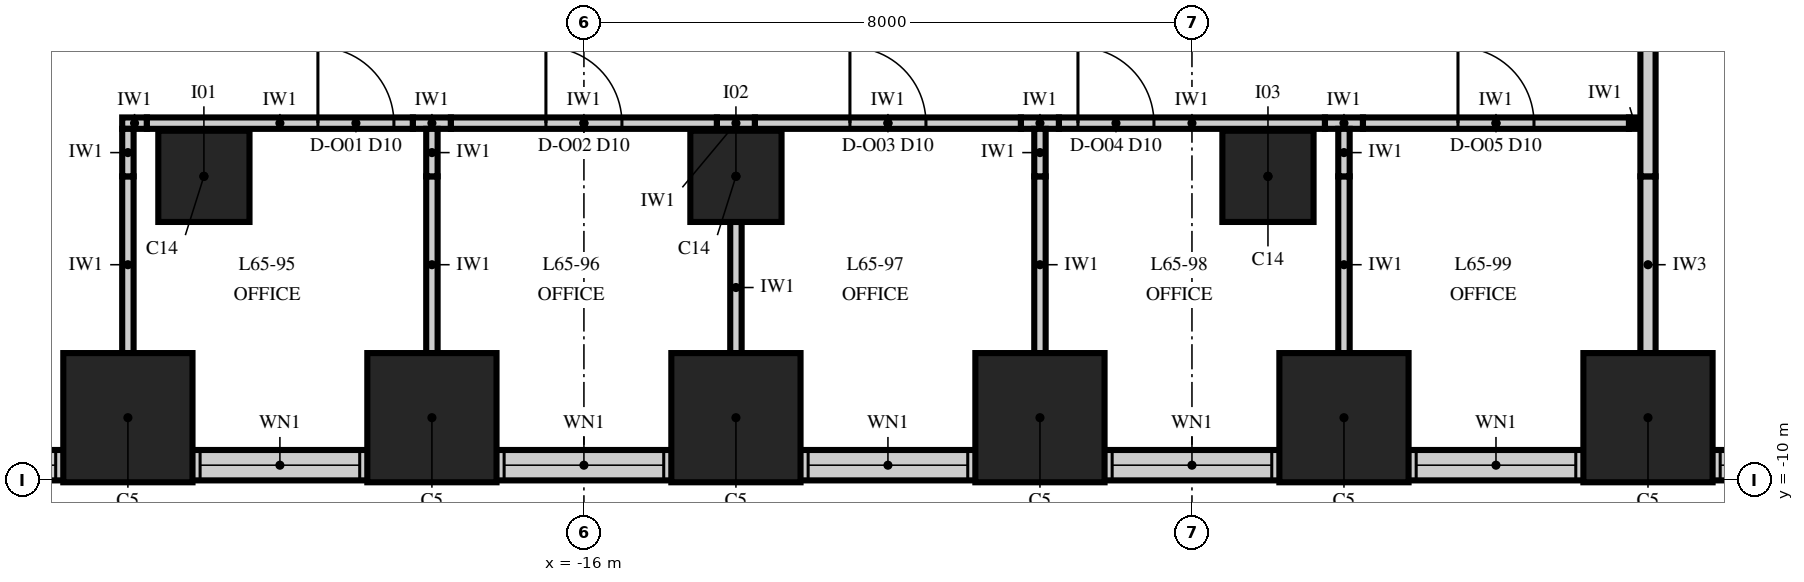
"""IFC4 building model, lengths in metres.
Left out: names, types, materials, properties, quantities, classifications, styles, units other than length and angle.
Written with IfcOpenShell. Run it as: python <this file> out.ifc"""

import sys

from ifc_helpers import new_model, si_unit, direction, frame, frame_2d, origin, origin_2d, place, context, subcontext, project, spatial, rectangle, extrude, element, fill, save


model = new_model("IFC4")
c1 = context("Model", 3, precision=1e-05, world=origin(), true_north=direction((0.0, 1.0)))
c2 = subcontext(c1, "Body", "Model", "MODEL_VIEW")
j1 = project(units=[si_unit("LENGTHUNIT", "METRE"), si_unit("PLANEANGLEUNIT", "RADIAN")], contexts=[c1])
p1 = place(None, origin())
s1 = spatial("IfcSite", under=j1, at=p1, CompositionType="ELEMENT")
p2 = place(p1, origin())
s2 = spatial("IfcBuilding", under=s1, at=p2, CompositionType="ELEMENT")
p3 = place(p2, frame((0.0, 0.0, 280.0)))
s3 = spatial("IfcBuildingStorey", under=s2, at=p3, CompositionType="ELEMENT", Elevation=280.0)
for number, where, z_axis, x_axis in (
    (1, (-22.0, -9.175, 0.0), (0.0, 0.0, 1.0), (1.0, 0.0, 0.0)),
    (2, (-18.0, -9.175, 0.0), (0.0, 0.0, 1.0), (1.0, 0.0, 0.0)),
    (3, (-14.0, -9.175, 0.0), (0.0, 0.0, 1.0), (1.0, 0.0, 0.0)),
    (4, (-10.0, -9.175, 0.0), (0.0, 0.0, 1.0), (1.0, 0.0, 0.0)),
    (5, (-6.0, -9.175, 0.0), (0.0, 0.0, 1.0), (1.0, 0.0, 0.0)),
    (6, (-2.0, -9.175, 0.0), (0.0, 0.0, 1.0), (1.0, 0.0, 0.0)),
):
    element("IfcColumn", number, at=place(p3, frame(where, z_axis=z_axis, x_axis=x_axis)), inside=s3, PredefinedType="COLUMN", context=c2, shape_type="SweptSolid", body=[
        extrude(rectangle(XDim=1.7, YDim=1.7, at=origin_2d()), origin(), (0.0, 0.0, 1.0), 4.0),
    ])
for number, where, z_axis, x_axis in (
    (7, (-21.0, -6.0, 0.0), (0.0, 0.0, 1.0), (1.0, 0.0, 0.0)),
    (8, (-14.0, -6.0, 0.0), (0.0, 0.0, 1.0), (1.0, 0.0, 0.0)),
    (9, (-7.0, -6.0, 0.0), (0.0, 0.0, 1.0), (1.0, 0.0, 0.0)),
):
    element("IfcColumn", number, at=place(p3, frame(where, z_axis=z_axis, x_axis=x_axis)), inside=s3, PredefinedType="COLUMN", context=c2, shape_type="SweptSolid", body=[
        extrude(rectangle(XDim=1.2, YDim=1.2, at=origin_2d()), origin(), (0.0, 0.0, 1.0), 4.0),
    ])
p4 = place(p3, frame((-26.0, -9.8, 0.0), z_axis=(0.0, 0.0, 1.0), x_axis=(1.0, 0.0, 0.0)))
e10 = element("IfcWall", 10, at=p4, inside=s3, PredefinedType="SOLIDWALL", context=c2, shape_type="SweptSolid", body=[
    extrude(rectangle(XDim=52.0, YDim=0.4, at=frame_2d((26.0, 0.0))), origin(), (0.0, 0.0, 1.0), 2.0),
])
p5 = place(p4, frame((0.95, 0.0, 0.8)))
e11 = element("IfcOpeningElement", 11, at=p5, cuts=e10, PredefinedType="OPENING", context=c2, shape_type="SweptSolid", body=[
    extrude(rectangle(XDim=2.1, YDim=1.15, at=frame_2d((1.05, 0.575))), frame((0.0, 0.215, 0.0), z_axis=(0.0, -1.0, 0.0), x_axis=(1.0, 0.0, 0.0)), (0.0, 0.0, 1.0), 0.43),
])
p6 = place(p4, frame((4.95, 0.0, 0.8)))
e12 = element("IfcOpeningElement", 12, at=p6, cuts=e10, PredefinedType="OPENING", context=c2, shape_type="SweptSolid", body=[
    extrude(rectangle(XDim=2.1, YDim=1.15, at=frame_2d((1.05, 0.575))), frame((0.0, 0.215, 0.0), z_axis=(0.0, -1.0, 0.0), x_axis=(1.0, 0.0, 0.0)), (0.0, 0.0, 1.0), 0.43),
])
p7 = place(p4, frame((8.95, 0.0, 0.8)))
e13 = element("IfcOpeningElement", 13, at=p7, cuts=e10, PredefinedType="OPENING", context=c2, shape_type="SweptSolid", body=[
    extrude(rectangle(XDim=2.1, YDim=1.15, at=frame_2d((1.05, 0.575))), frame((0.0, 0.215, 0.0), z_axis=(0.0, -1.0, 0.0), x_axis=(1.0, 0.0, 0.0)), (0.0, 0.0, 1.0), 0.43),
])
p8 = place(p4, frame((12.95, 0.0, 0.8)))
e14 = element("IfcOpeningElement", 14, at=p8, cuts=e10, PredefinedType="OPENING", context=c2, shape_type="SweptSolid", body=[
    extrude(rectangle(XDim=2.1, YDim=1.15, at=frame_2d((1.05, 0.575))), frame((0.0, 0.215, 0.0), z_axis=(0.0, -1.0, 0.0), x_axis=(1.0, 0.0, 0.0)), (0.0, 0.0, 1.0), 0.43),
])
p9 = place(p4, frame((16.95, 0.0, 0.8)))
e15 = element("IfcOpeningElement", 15, at=p9, cuts=e10, PredefinedType="OPENING", context=c2, shape_type="SweptSolid", body=[
    extrude(rectangle(XDim=2.1, YDim=1.15, at=frame_2d((1.05, 0.575))), frame((0.0, 0.215, 0.0), z_axis=(0.0, -1.0, 0.0), x_axis=(1.0, 0.0, 0.0)), (0.0, 0.0, 1.0), 0.43),
])
p10 = place(p4, frame((20.95, 0.0, 0.8)))
e16 = element("IfcOpeningElement", 16, at=p10, cuts=e10, PredefinedType="OPENING", context=c2, shape_type="SweptSolid", body=[
    extrude(rectangle(XDim=2.1, YDim=1.15, at=frame_2d((1.05, 0.575))), frame((0.0, 0.215, 0.0), z_axis=(0.0, -1.0, 0.0), x_axis=(1.0, 0.0, 0.0)), (0.0, 0.0, 1.0), 0.43),
])
p11 = place(p4, frame((24.95, 0.0, 0.8)))
e17 = element("IfcOpeningElement", 17, at=p11, cuts=e10, PredefinedType="OPENING", context=c2, shape_type="SweptSolid", body=[
    extrude(rectangle(XDim=2.1, YDim=1.15, at=frame_2d((1.05, 0.575))), frame((0.0, 0.215, 0.0), z_axis=(0.0, -1.0, 0.0), x_axis=(1.0, 0.0, 0.0)), (0.0, 0.0, 1.0), 0.43),
])
p12 = place(p4, frame((28.95, 0.0, 0.8)))
e18 = element("IfcOpeningElement", 18, at=p12, cuts=e10, PredefinedType="OPENING", context=c2, shape_type="SweptSolid", body=[
    extrude(rectangle(XDim=2.1, YDim=1.15, at=frame_2d((1.05, 0.575))), frame((0.0, 0.215, 0.0), z_axis=(0.0, -1.0, 0.0), x_axis=(1.0, 0.0, 0.0)), (0.0, 0.0, 1.0), 0.43),
])
p13 = place(p4, frame((32.95, 0.0, 0.8)))
e19 = element("IfcOpeningElement", 19, at=p13, cuts=e10, PredefinedType="OPENING", context=c2, shape_type="SweptSolid", body=[
    extrude(rectangle(XDim=2.1, YDim=1.15, at=frame_2d((1.05, 0.575))), frame((0.0, 0.215, 0.0), z_axis=(0.0, -1.0, 0.0), x_axis=(1.0, 0.0, 0.0)), (0.0, 0.0, 1.0), 0.43),
])
p14 = place(p4, frame((36.95, 0.0, 0.8)))
e20 = element("IfcOpeningElement", 20, at=p14, cuts=e10, PredefinedType="OPENING", context=c2, shape_type="SweptSolid", body=[
    extrude(rectangle(XDim=2.1, YDim=1.15, at=frame_2d((1.05, 0.575))), frame((0.0, 0.215, 0.0), z_axis=(0.0, -1.0, 0.0), x_axis=(1.0, 0.0, 0.0)), (0.0, 0.0, 1.0), 0.43),
])
p15 = place(p4, frame((40.95, 0.0, 0.8)))
e21 = element("IfcOpeningElement", 21, at=p15, cuts=e10, PredefinedType="OPENING", context=c2, shape_type="SweptSolid", body=[
    extrude(rectangle(XDim=2.1, YDim=1.15, at=frame_2d((1.05, 0.575))), frame((0.0, 0.215, 0.0), z_axis=(0.0, -1.0, 0.0), x_axis=(1.0, 0.0, 0.0)), (0.0, 0.0, 1.0), 0.43),
])
p16 = place(p4, frame((44.95, 0.0, 0.8)))
e22 = element("IfcOpeningElement", 22, at=p16, cuts=e10, PredefinedType="OPENING", context=c2, shape_type="SweptSolid", body=[
    extrude(rectangle(XDim=2.1, YDim=1.15, at=frame_2d((1.05, 0.575))), frame((0.0, 0.215, 0.0), z_axis=(0.0, -1.0, 0.0), x_axis=(1.0, 0.0, 0.0)), (0.0, 0.0, 1.0), 0.43),
])
p17 = place(p4, frame((48.95, 0.0, 0.8)))
e23 = element("IfcOpeningElement", 23, at=p17, cuts=e10, PredefinedType="OPENING", context=c2, shape_type="SweptSolid", body=[
    extrude(rectangle(XDim=2.1, YDim=1.15, at=frame_2d((1.05, 0.575))), frame((0.0, 0.215, 0.0), z_axis=(0.0, -1.0, 0.0), x_axis=(1.0, 0.0, 0.0)), (0.0, 0.0, 1.0), 0.43),
])
p18 = place(p3, frame((-22.075, -5.3, 0.0), z_axis=(0.0, 0.0, 1.0), x_axis=(1.0, 0.0, 0.0)))
e24 = element("IfcWall", 24, at=p18, inside=s3, PredefinedType="PARTITIONING", context=c2, shape_type="SweptSolid", body=[
    extrude(rectangle(XDim=0.325, YDim=0.15, at=frame_2d((0.163, 0.0))), origin(), (0.0, 0.0, 1.0), 2.25),
])
p19 = place(p3, frame((-21.75, -5.3, 0.0), z_axis=(0.0, 0.0, 1.0), x_axis=(1.0, 0.0, 0.0)))
e25 = element("IfcWall", 25, at=p19, inside=s3, PredefinedType="PARTITIONING", context=c2, shape_type="SweptSolid", body=[
    extrude(rectangle(XDim=3.5, YDim=0.15, at=frame_2d((1.75, 0.0))), origin(), (0.0, 0.0, 1.0), 3.85),
])
p20 = place(p19, frame((2.25, 0.0, 0.0)))
e26 = element("IfcOpeningElement", 26, at=p20, cuts=e25, PredefinedType="OPENING", context=c2, shape_type="SweptSolid", body=[
    extrude(rectangle(XDim=1.0, YDim=2.3, at=frame_2d((0.5, 1.15))), frame((0.0, 0.09, 0.0), z_axis=(0.0, -1.0, 0.0), x_axis=(1.0, 0.0, 0.0)), (0.0, 0.0, 1.0), 0.18),
])
p21 = place(p3, frame((-18.25, -5.3, 0.0), z_axis=(0.0, 0.0, 1.0), x_axis=(1.0, 0.0, 0.0)))
e27 = element("IfcWall", 27, at=p21, inside=s3, PredefinedType="PARTITIONING", context=c2, shape_type="SweptSolid", body=[
    extrude(rectangle(XDim=0.5, YDim=0.15, at=frame_2d((0.25, 0.0))), origin(), (0.0, 0.0, 1.0), 2.25),
])
p22 = place(p3, frame((-17.75, -5.3, 0.0), z_axis=(0.0, 0.0, 1.0), x_axis=(1.0, 0.0, 0.0)))
e28 = element("IfcWall", 28, at=p22, inside=s3, PredefinedType="PARTITIONING", context=c2, shape_type="SweptSolid", body=[
    extrude(rectangle(XDim=3.5, YDim=0.15, at=frame_2d((1.75, 0.0))), origin(), (0.0, 0.0, 1.0), 3.85),
])
p23 = place(p22, frame((1.25, 0.0, 0.0)))
e29 = element("IfcOpeningElement", 29, at=p23, cuts=e28, PredefinedType="OPENING", context=c2, shape_type="SweptSolid", body=[
    extrude(rectangle(XDim=1.0, YDim=2.3, at=frame_2d((0.5, 1.15))), frame((0.0, 0.09, 0.0), z_axis=(0.0, -1.0, 0.0), x_axis=(1.0, 0.0, 0.0)), (0.0, 0.0, 1.0), 0.18),
])
p24 = place(p3, frame((-14.25, -5.3, 0.0), z_axis=(0.0, 0.0, 1.0), x_axis=(1.0, 0.0, 0.0)))
e30 = element("IfcWall", 30, at=p24, inside=s3, PredefinedType="PARTITIONING", context=c2, shape_type="SweptSolid", body=[
    extrude(rectangle(XDim=0.5, YDim=0.15, at=frame_2d((0.25, 0.0))), origin(), (0.0, 0.0, 1.0), 2.25),
])
p25 = place(p3, frame((-13.75, -5.3, 0.0), z_axis=(0.0, 0.0, 1.0), x_axis=(1.0, 0.0, 0.0)))
e31 = element("IfcWall", 31, at=p25, inside=s3, PredefinedType="PARTITIONING", context=c2, shape_type="SweptSolid", body=[
    extrude(rectangle(XDim=3.5, YDim=0.15, at=frame_2d((1.75, 0.0))), origin(), (0.0, 0.0, 1.0), 3.85),
])
p26 = place(p25, frame((1.25, 0.0, 0.0)))
e32 = element("IfcOpeningElement", 32, at=p26, cuts=e31, PredefinedType="OPENING", context=c2, shape_type="SweptSolid", body=[
    extrude(rectangle(XDim=1.0, YDim=2.3, at=frame_2d((0.5, 1.15))), frame((0.0, 0.09, 0.0), z_axis=(0.0, -1.0, 0.0), x_axis=(1.0, 0.0, 0.0)), (0.0, 0.0, 1.0), 0.18),
])
p27 = place(p3, frame((-10.25, -5.3, 0.0), z_axis=(0.0, 0.0, 1.0), x_axis=(1.0, 0.0, 0.0)))
e33 = element("IfcWall", 33, at=p27, inside=s3, PredefinedType="PARTITIONING", context=c2, shape_type="SweptSolid", body=[
    extrude(rectangle(XDim=0.5, YDim=0.15, at=frame_2d((0.25, 0.0))), origin(), (0.0, 0.0, 1.0), 2.25),
])
p28 = place(p3, frame((-9.75, -5.3, 0.0), z_axis=(0.0, 0.0, 1.0), x_axis=(1.0, 0.0, 0.0)))
e34 = element("IfcWall", 34, at=p28, inside=s3, PredefinedType="PARTITIONING", context=c2, shape_type="SweptSolid", body=[
    extrude(rectangle(XDim=3.5, YDim=0.15, at=frame_2d((1.75, 0.0))), origin(), (0.0, 0.0, 1.0), 3.85),
])
p29 = place(p28, frame((0.25, 0.0, 0.0)))
e35 = element("IfcOpeningElement", 35, at=p29, cuts=e34, PredefinedType="OPENING", context=c2, shape_type="SweptSolid", body=[
    extrude(rectangle(XDim=1.0, YDim=2.3, at=frame_2d((0.5, 1.15))), frame((0.0, 0.09, 0.0), z_axis=(0.0, -1.0, 0.0), x_axis=(1.0, 0.0, 0.0)), (0.0, 0.0, 1.0), 0.18),
])
p30 = place(p3, frame((-6.25, -5.3, 0.0), z_axis=(0.0, 0.0, 1.0), x_axis=(1.0, 0.0, 0.0)))
e36 = element("IfcWall", 36, at=p30, inside=s3, PredefinedType="PARTITIONING", context=c2, shape_type="SweptSolid", body=[
    extrude(rectangle(XDim=0.5, YDim=0.15, at=frame_2d((0.25, 0.0))), origin(), (0.0, 0.0, 1.0), 2.25),
])
p31 = place(p3, frame((-5.75, -5.3, 0.0), z_axis=(0.0, 0.0, 1.0), x_axis=(1.0, 0.0, 0.0)))
e37 = element("IfcWall", 37, at=p31, inside=s3, PredefinedType="PARTITIONING", context=c2, shape_type="SweptSolid", body=[
    extrude(rectangle(XDim=3.5, YDim=0.15, at=frame_2d((1.75, 0.0))), origin(), (0.0, 0.0, 1.0), 3.85),
])
p32 = place(p31, frame((1.25, 0.0, 0.0)))
e38 = element("IfcOpeningElement", 38, at=p32, cuts=e37, PredefinedType="OPENING", context=c2, shape_type="SweptSolid", body=[
    extrude(rectangle(XDim=1.0, YDim=2.3, at=frame_2d((0.5, 1.15))), frame((0.0, 0.09, 0.0), z_axis=(0.0, -1.0, 0.0), x_axis=(1.0, 0.0, 0.0)), (0.0, 0.0, 1.0), 0.18),
])
p33 = place(p3, frame((-2.25, -5.3, 0.0), z_axis=(0.0, 0.0, 1.0), x_axis=(1.0, 0.0, 0.0)))
e39 = element("IfcWall", 39, at=p33, inside=s3, PredefinedType="PARTITIONING", context=c2, shape_type="SweptSolid", body=[
    extrude(rectangle(XDim=0.15, YDim=0.15, at=frame_2d((0.075, 0.0))), origin(), (0.0, 0.0, 1.0), 2.25),
])
p34 = place(p3, frame((-22.0, -8.325, 0.0), z_axis=(0.0, 0.0, 1.0), x_axis=(0.0, 1.0, 0.0)))
e40 = element("IfcWall", 40, at=p34, inside=s3, PredefinedType="PARTITIONING", context=c2, shape_type="SweptSolid", body=[
    extrude(rectangle(XDim=2.325, YDim=0.15, at=frame_2d((1.163, 0.0))), origin(), (0.0, 0.0, 1.0), 2.75),
])
p35 = place(p3, frame((-22.0, -6.0, 0.0), z_axis=(0.0, 0.0, 1.0), x_axis=(0.0, 1.0, 0.0)))
e41 = element("IfcWall", 41, at=p35, inside=s3, PredefinedType="PARTITIONING", context=c2, shape_type="SweptSolid", body=[
    extrude(rectangle(XDim=0.625, YDim=0.15, at=frame_2d((0.312, 0.0))), origin(), (0.0, 0.0, 1.0), 2.25),
])
p36 = place(p3, frame((-18.0, -8.325, 0.0), z_axis=(0.0, 0.0, 1.0), x_axis=(0.0, 1.0, 0.0)))
e42 = element("IfcWall", 42, at=p36, inside=s3, PredefinedType="PARTITIONING", context=c2, shape_type="SweptSolid", body=[
    extrude(rectangle(XDim=2.325, YDim=0.15, at=frame_2d((1.163, 0.0))), origin(), (0.0, 0.0, 1.0), 2.75),
])
p37 = place(p3, frame((-18.0, -6.0, 0.0), z_axis=(0.0, 0.0, 1.0), x_axis=(0.0, 1.0, 0.0)))
e43 = element("IfcWall", 43, at=p37, inside=s3, PredefinedType="PARTITIONING", context=c2, shape_type="SweptSolid", body=[
    extrude(rectangle(XDim=0.625, YDim=0.15, at=frame_2d((0.312, 0.0))), origin(), (0.0, 0.0, 1.0), 2.25),
])
p38 = place(p3, frame((-14.0, -8.325, 0.0), z_axis=(0.0, 0.0, 1.0), x_axis=(0.0, 1.0, 0.0)))
e44 = element("IfcWall", 44, at=p38, inside=s3, PredefinedType="PARTITIONING", context=c2, shape_type="SweptSolid", body=[
    extrude(rectangle(XDim=1.725, YDim=0.15, at=frame_2d((0.862, 0.0))), origin(), (0.0, 0.0, 1.0), 3.13),
])
p39 = place(p3, frame((-10.0, -8.325, 0.0), z_axis=(0.0, 0.0, 1.0), x_axis=(0.0, 1.0, 0.0)))
e45 = element("IfcWall", 45, at=p39, inside=s3, PredefinedType="PARTITIONING", context=c2, shape_type="SweptSolid", body=[
    extrude(rectangle(XDim=2.325, YDim=0.15, at=frame_2d((1.163, 0.0))), origin(), (0.0, 0.0, 1.0), 2.75),
])
p40 = place(p3, frame((-10.0, -6.0, 0.0), z_axis=(0.0, 0.0, 1.0), x_axis=(0.0, 1.0, 0.0)))
e46 = element("IfcWall", 46, at=p40, inside=s3, PredefinedType="PARTITIONING", context=c2, shape_type="SweptSolid", body=[
    extrude(rectangle(XDim=0.625, YDim=0.15, at=frame_2d((0.312, 0.0))), origin(), (0.0, 0.0, 1.0), 2.25),
])
p41 = place(p3, frame((-6.0, -8.325, 0.0), z_axis=(0.0, 0.0, 1.0), x_axis=(0.0, 1.0, 0.0)))
e47 = element("IfcWall", 47, at=p41, inside=s3, PredefinedType="PARTITIONING", context=c2, shape_type="SweptSolid", body=[
    extrude(rectangle(XDim=2.325, YDim=0.15, at=frame_2d((1.163, 0.0))), origin(), (0.0, 0.0, 1.0), 2.75),
])
p42 = place(p3, frame((-6.0, -6.0, 0.0), z_axis=(0.0, 0.0, 1.0), x_axis=(0.0, 1.0, 0.0)))
e48 = element("IfcWall", 48, at=p42, inside=s3, PredefinedType="PARTITIONING", context=c2, shape_type="SweptSolid", body=[
    extrude(rectangle(XDim=0.625, YDim=0.15, at=frame_2d((0.312, 0.0))), origin(), (0.0, 0.0, 1.0), 2.25),
])
p43 = place(p3, frame((-2.0, -8.325, 0.0), z_axis=(0.0, 0.0, 1.0), x_axis=(0.0, 1.0, 0.0)))
e49 = element("IfcWall", 49, at=p43, inside=s3, PredefinedType="PARTITIONING", context=c2, shape_type="SweptSolid", body=[
    extrude(rectangle(XDim=2.325, YDim=0.2, at=frame_2d((1.163, 0.0))), origin(), (0.0, 0.0, 1.0), 2.75),
])
p44 = place(p3, frame((-2.0, -6.0, 0.0), z_axis=(0.0, 0.0, 1.0), x_axis=(0.0, 1.0, 0.0)))
e50 = element("IfcWall", 50, at=p44, inside=s3, PredefinedType="PARTITIONING", context=c2, shape_type="SweptSolid", body=[
    extrude(rectangle(XDim=9.85, YDim=0.2, at=frame_2d((4.925, 0.0))), origin(), (0.0, 0.0, 1.0), 2.25),
])
p45 = place(p5, origin())
e51 = element("IfcWindow", 51, at=p45, inside=s3, PartitioningType="SINGLE_PANEL", PredefinedType="WINDOW", context=c2, shape_type="SweptSolid", body=[
    extrude(rectangle(XDim=2.1, YDim=1.15, at=frame_2d((1.05, 0.575))), frame((0.0, 0.03, 0.0), z_axis=(0.0, -1.0, 0.0), x_axis=(1.0, 0.0, 0.0)), (0.0, 0.0, 1.0), 0.06),
])
fill(e11, e51)
p46 = place(p6, origin())
e52 = element("IfcWindow", 52, at=p46, inside=s3, PartitioningType="SINGLE_PANEL", PredefinedType="WINDOW", context=c2, shape_type="SweptSolid", body=[
    extrude(rectangle(XDim=2.1, YDim=1.15, at=frame_2d((1.05, 0.575))), frame((0.0, 0.03, 0.0), z_axis=(0.0, -1.0, 0.0), x_axis=(1.0, 0.0, 0.0)), (0.0, 0.0, 1.0), 0.06),
])
fill(e12, e52)
p47 = place(p7, origin())
e53 = element("IfcWindow", 53, at=p47, inside=s3, PartitioningType="SINGLE_PANEL", PredefinedType="WINDOW", context=c2, shape_type="SweptSolid", body=[
    extrude(rectangle(XDim=2.1, YDim=1.15, at=frame_2d((1.05, 0.575))), frame((0.0, 0.03, 0.0), z_axis=(0.0, -1.0, 0.0), x_axis=(1.0, 0.0, 0.0)), (0.0, 0.0, 1.0), 0.06),
])
fill(e13, e53)
p48 = place(p8, origin())
e54 = element("IfcWindow", 54, at=p48, inside=s3, PartitioningType="SINGLE_PANEL", PredefinedType="WINDOW", context=c2, shape_type="SweptSolid", body=[
    extrude(rectangle(XDim=2.1, YDim=1.15, at=frame_2d((1.05, 0.575))), frame((0.0, 0.03, 0.0), z_axis=(0.0, -1.0, 0.0), x_axis=(1.0, 0.0, 0.0)), (0.0, 0.0, 1.0), 0.06),
])
fill(e14, e54)
p49 = place(p9, origin())
e55 = element("IfcWindow", 55, at=p49, inside=s3, PartitioningType="SINGLE_PANEL", PredefinedType="WINDOW", context=c2, shape_type="SweptSolid", body=[
    extrude(rectangle(XDim=2.1, YDim=1.15, at=frame_2d((1.05, 0.575))), frame((0.0, 0.03, 0.0), z_axis=(0.0, -1.0, 0.0), x_axis=(1.0, 0.0, 0.0)), (0.0, 0.0, 1.0), 0.06),
])
fill(e15, e55)
p50 = place(p10, origin())
e56 = element("IfcWindow", 56, at=p50, inside=s3, PartitioningType="SINGLE_PANEL", PredefinedType="WINDOW", context=c2, shape_type="SweptSolid", body=[
    extrude(rectangle(XDim=2.1, YDim=1.15, at=frame_2d((1.05, 0.575))), frame((0.0, 0.03, 0.0), z_axis=(0.0, -1.0, 0.0), x_axis=(1.0, 0.0, 0.0)), (0.0, 0.0, 1.0), 0.06),
])
fill(e16, e56)
p51 = place(p11, origin())
e57 = element("IfcWindow", 57, at=p51, inside=s3, PartitioningType="SINGLE_PANEL", PredefinedType="WINDOW", context=c2, shape_type="SweptSolid", body=[
    extrude(rectangle(XDim=2.1, YDim=1.15, at=frame_2d((1.05, 0.575))), frame((0.0, 0.03, 0.0), z_axis=(0.0, -1.0, 0.0), x_axis=(1.0, 0.0, 0.0)), (0.0, 0.0, 1.0), 0.06),
])
fill(e17, e57)
p52 = place(p20, origin())
e58 = element("IfcDoor", 58, at=p52, inside=s3, OperationType="SINGLE_SWING_LEFT", PredefinedType="DOOR", context=c2, shape_type="SweptSolid", body=[
    extrude(rectangle(XDim=1.0, YDim=2.3, at=frame_2d((0.5, 1.15))), frame((0.0, 0.075, 0.0), z_axis=(0.0, -1.0, 0.0), x_axis=(1.0, 0.0, 0.0)), (0.0, 0.0, 1.0), 0.149),
])
fill(e26, e58)
p53 = place(p23, origin())
e59 = element("IfcDoor", 59, at=p53, inside=s3, OperationType="SINGLE_SWING_LEFT", PredefinedType="DOOR", context=c2, shape_type="SweptSolid", body=[
    extrude(rectangle(XDim=1.0, YDim=2.3, at=frame_2d((0.5, 1.15))), frame((0.0, 0.075, 0.0), z_axis=(0.0, -1.0, 0.0), x_axis=(1.0, 0.0, 0.0)), (0.0, 0.0, 1.0), 0.149),
])
fill(e29, e59)
p54 = place(p26, origin())
e60 = element("IfcDoor", 60, at=p54, inside=s3, OperationType="SINGLE_SWING_LEFT", PredefinedType="DOOR", context=c2, shape_type="SweptSolid", body=[
    extrude(rectangle(XDim=1.0, YDim=2.3, at=frame_2d((0.5, 1.15))), frame((0.0, 0.075, 0.0), z_axis=(0.0, -1.0, 0.0), x_axis=(1.0, 0.0, 0.0)), (0.0, 0.0, 1.0), 0.149),
])
fill(e32, e60)
p55 = place(p29, origin())
e61 = element("IfcDoor", 61, at=p55, inside=s3, OperationType="SINGLE_SWING_LEFT", PredefinedType="DOOR", context=c2, shape_type="SweptSolid", body=[
    extrude(rectangle(XDim=1.0, YDim=2.3, at=frame_2d((0.5, 1.15))), frame((0.0, 0.075, 0.0), z_axis=(0.0, -1.0, 0.0), x_axis=(1.0, 0.0, 0.0)), (0.0, 0.0, 1.0), 0.149),
])
fill(e35, e61)
p56 = place(p32, origin())
e62 = element("IfcDoor", 62, at=p56, inside=s3, OperationType="SINGLE_SWING_LEFT", PredefinedType="DOOR", context=c2, shape_type="SweptSolid", body=[
    extrude(rectangle(XDim=1.0, YDim=2.3, at=frame_2d((0.5, 1.15))), frame((0.0, 0.075, 0.0), z_axis=(0.0, -1.0, 0.0), x_axis=(1.0, 0.0, 0.0)), (0.0, 0.0, 1.0), 0.149),
])
fill(e38, e62)
save(model, sys.argv[1])
